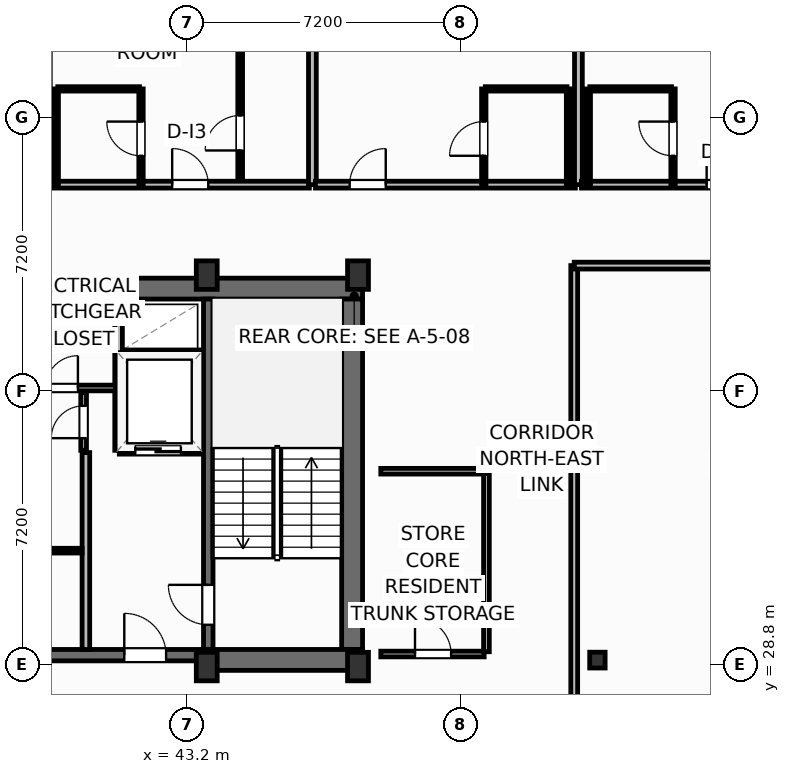
"""IFC4 building model, lengths in metres.
Left out: names, types, materials, properties, quantities, classifications, styles, units other than length and angle.
Written with IfcOpenShell. Run it as: python <this file> out.ifc"""

import sys

from ifc_helpers import new_model, si_unit, direction, frame, frame_2d, origin, origin_2d, place, context, subcontext, project, spatial, rectangle, i_section, extrude, element, fill, save


model = new_model("IFC4")
c1 = context("Model", 3, precision=1e-05, world=origin(), true_north=direction((0.0, 1.0)))
c2 = subcontext(c1, "Body", "Model", "MODEL_VIEW")
j1 = project(units=[si_unit("LENGTHUNIT", "METRE"), si_unit("PLANEANGLEUNIT", "RADIAN")], contexts=[c1])
p1 = place(None, origin())
s1 = spatial("IfcSite", under=j1, at=p1, CompositionType="ELEMENT")
p2 = place(p1, origin())
s2 = spatial("IfcBuilding", under=s1, at=p2, CompositionType="ELEMENT")
p3 = place(p2, frame((0.0, 0.0, 280.4)))
s3 = spatial("IfcBuildingStorey", under=s2, at=p3, CompositionType="ELEMENT", Elevation=280.4)
for number, where, z_axis, x_axis in (
    (1, (43.72, 28.75, 0.0), (0.0, 0.0, 1.0), (1.0, 0.0, 0.0)),
    (2, (47.7, 28.75, 0.0), (0.0, 0.0, 1.0), (1.0, 0.0, 0.0)),
    (3, (43.72, 39.05, 0.0), (0.0, 0.0, 1.0), (1.0, 0.0, 0.0)),
    (4, (47.7, 39.05, 0.0), (0.0, 0.0, 1.0), (1.0, 0.0, 0.0)),
):
    element("IfcColumn", number, at=place(p3, frame(where, z_axis=z_axis, x_axis=x_axis)), inside=s3, PredefinedType="COLUMN", context=c2, shape_type="SweptSolid", body=[
        extrude(rectangle(XDim=0.55, YDim=0.75, at=origin_2d()), origin(), (0.0, 0.0, 1.0), 3.7),
    ])
p4 = place(p3, frame((54.0, 28.92, 0.0), z_axis=(0.0, 0.0, 1.0), x_axis=(1.0, 0.0, 0.0)))
e5 = element("IfcColumn", 5, at=p4, inside=s3, PredefinedType="COLUMN", context=c2, shape_type="SweptSolid", body=[
    extrude(i_section(OverallWidth=0.406, OverallDepth=0.416, WebThickness=0.03, FlangeThickness=0.048, FilletRadius=0.025, at=origin_2d()), origin(), (0.0, 0.0, 1.0), 3.7),
])
p5 = place(p3, frame((30.58, 38.695, 0.0), z_axis=(0.0, 0.0, 1.0), x_axis=(1.0, 0.0, 0.0)))
e6 = element("IfcWall", 6, at=p5, inside=s3, PredefinedType="SHEAR", context=c2, shape_type="SweptSolid", body=[
    extrude(rectangle(XDim=17.24, YDim=0.55, at=frame_2d((8.62, 0.0))), origin(), (0.0, 0.0, 1.0), 3.45),
])
p6 = place(p3, frame((47.545, 29.2, 0.0), z_axis=(0.0, 0.0, 1.0), x_axis=(0.0, 1.0, 0.0)))
e7 = element("IfcWall", 7, at=p6, inside=s3, PredefinedType="SHEAR", context=c2, shape_type="SweptSolid", body=[
    extrude(rectangle(XDim=9.22, YDim=0.55, at=frame_2d((4.61, 0.0))), origin(), (0.0, 0.0, 1.0), 3.45),
])
p7 = place(p3, frame((43.6, 28.925, 0.0), z_axis=(0.0, 0.0, 1.0), x_axis=(1.0, 0.0, 0.0)))
e8 = element("IfcWall", 8, at=p7, inside=s3, PredefinedType="SHEAR", context=c2, shape_type="SweptSolid", body=[
    extrude(rectangle(XDim=4.22, YDim=0.55, at=frame_2d((2.11, 0.0))), origin(), (0.0, 0.0, 1.0), 3.45),
])
p8 = place(p3, frame((34.8, 29.05, 0.0), z_axis=(0.0, 0.0, 1.0), x_axis=(1.0, 0.0, 0.0)))
e9 = element("IfcWall", 9, at=p8, inside=s3, PredefinedType="SHEAR", context=c2, shape_type="SweptSolid", body=[
    extrude(rectangle(XDim=8.8, YDim=0.3, at=frame_2d((4.4, 0.0))), origin(), (0.0, 0.0, 1.0), 3.45),
])
p9 = place(p8, frame((0.95, 0.0, 0.0)))
e10 = element("IfcOpeningElement", 10, at=p9, cuts=e9, PredefinedType="OPENING", context=c2, shape_type="SweptSolid", body=[
    extrude(rectangle(XDim=1.1, YDim=2.15, at=frame_2d((0.55, 1.075))), frame((0.0, 0.16, 0.0), z_axis=(0.0, -1.0, 0.0), x_axis=(1.0, 0.0, 0.0)), (0.0, 0.0, 1.0), 0.32),
])
p10 = place(p8, frame((6.75, 0.0, 0.0)))
e11 = element("IfcOpeningElement", 11, at=p10, cuts=e9, PredefinedType="OPENING", context=c2, shape_type="SweptSolid", body=[
    extrude(rectangle(XDim=1.1, YDim=2.15, at=frame_2d((0.55, 1.075))), frame((0.0, 0.16, 0.0), z_axis=(0.0, -1.0, 0.0), x_axis=(1.0, 0.0, 0.0)), (0.0, 0.0, 1.0), 0.32),
])
p11 = place(p8, frame((3.32, 0.0, 0.0)))
e12 = element("IfcOpeningElement", 12, at=p11, cuts=e9, PredefinedType="OPENING", context=c2, shape_type="SweptSolid", body=[
    extrude(rectangle(XDim=0.95, YDim=2.15, at=frame_2d((0.475, 1.075))), frame((0.0, 0.16, 0.0), z_axis=(0.0, -1.0, 0.0), x_axis=(1.0, 0.0, 0.0)), (0.0, 0.0, 1.0), 0.32),
])
p12 = place(p3, frame((43.76, 29.2, 0.0), z_axis=(0.0, 0.0, 1.0), x_axis=(0.0, 1.0, 0.0)))
e13 = element("IfcWall", 13, at=p12, inside=s3, PredefinedType="SHEAR", context=c2, shape_type="SweptSolid", body=[
    extrude(rectangle(XDim=9.22, YDim=0.25, at=frame_2d((4.61, 0.0))), origin(), (0.0, 0.0, 1.0), 3.45),
])
p13 = place(p12, frame((0.65, 0.0, 0.0)))
e14 = element("IfcOpeningElement", 14, at=p13, cuts=e13, PredefinedType="OPENING", context=c2, shape_type="SweptSolid", body=[
    extrude(rectangle(XDim=1.05, YDim=2.15, at=frame_2d((0.525, 1.075))), frame((0.0, 0.135, 0.0), z_axis=(0.0, -1.0, 0.0), x_axis=(1.0, 0.0, 0.0)), (0.0, 0.0, 1.0), 0.27),
])
p14 = place(p3, frame((44.6, 41.43, 0.0), z_axis=(0.0, 0.0, 1.0), x_axis=(0.0, 1.0, 0.0)))
e15 = element("IfcWall", 15, at=p14, inside=s3, PredefinedType="PARTITIONING", context=c2, shape_type="SweptSolid", body=[
    extrude(rectangle(XDim=12.434, YDim=0.125, at=frame_2d((6.217, 0.0))), origin(), (0.0, 0.0, 1.0), 3.45),
])
p15 = place(p14, frame((0.9, 0.0, 0.0)))
e16 = element("IfcOpeningElement", 16, at=p15, cuts=e15, PredefinedType="OPENING", context=c2, shape_type="SweptSolid", body=[
    extrude(rectangle(XDim=0.92, YDim=2.05, at=frame_2d((0.46, 1.025))), frame((0.0, 0.073, 0.0), z_axis=(0.0, -1.0, 0.0), x_axis=(1.0, 0.0, 0.0)), (0.0, 0.0, 1.0), 0.145),
])
p16 = place(p3, frame((39.58, 41.43, 0.0), z_axis=(0.0, 0.0, 1.0), x_axis=(1.0, 0.0, 0.0)))
e17 = element("IfcWall", 17, at=p16, inside=s3, PredefinedType="PARTITIONING", context=c2, shape_type="SweptSolid", body=[
    extrude(rectangle(XDim=6.84, YDim=0.18, at=frame_2d((3.42, 0.0))), origin(), (0.0, 0.0, 1.0), 3.45),
])
p17 = place(p16, frame((3.23, 0.0, 0.0)))
e18 = element("IfcOpeningElement", 18, at=p17, cuts=e17, PredefinedType="OPENING", context=c2, shape_type="SweptSolid", body=[
    extrude(rectangle(XDim=0.95, YDim=2.15, at=frame_2d((0.475, 1.075))), frame((0.0, 0.1, 0.0), z_axis=(0.0, -1.0, 0.0), x_axis=(1.0, 0.0, 0.0)), (0.0, 0.0, 1.0), 0.2),
])
p18 = place(p3, frame((39.8, 43.95, 0.0), z_axis=(0.0, 0.0, 1.0), x_axis=(1.0, 0.0, 0.0)))
e19 = element("IfcWall", 19, at=p18, inside=s3, PredefinedType="PARTITIONING", context=c2, shape_type="SweptSolid", body=[
    extrude(rectangle(XDim=2.15, YDim=0.115, at=frame_2d((1.075, 0.0))), origin(), (0.0, 0.0, 1.0), 3.45),
])
p19 = place(p3, frame((41.99, 41.43, 0.0), z_axis=(0.0, 0.0, 1.0), x_axis=(0.0, 1.0, 0.0)))
e20 = element("IfcWall", 20, at=p19, inside=s3, PredefinedType="PARTITIONING", context=c2, shape_type="SweptSolid", body=[
    extrude(rectangle(XDim=2.52, YDim=0.115, at=frame_2d((1.26, 0.0))), origin(), (0.0, 0.0, 1.0), 3.45),
])
p20 = place(p19, frame((0.76, 0.0, 0.0)))
e21 = element("IfcOpeningElement", 21, at=p20, cuts=e20, PredefinedType="OPENING", context=c2, shape_type="SweptSolid", body=[
    extrude(rectangle(XDim=0.9, YDim=2.05, at=frame_2d((0.45, 1.025))), frame((0.0, 0.067, 0.0), z_axis=(0.0, -1.0, 0.0), x_axis=(1.0, 0.0, 0.0)), (0.0, 0.0, 1.0), 0.135),
])
p21 = place(p3, frame((39.76, 41.43, 0.0), z_axis=(0.0, 0.0, 1.0), x_axis=(0.0, 1.0, 0.0)))
e22 = element("IfcWall", 22, at=p21, inside=s3, PredefinedType="PARTITIONING", context=c2, shape_type="SweptSolid", body=[
    extrude(rectangle(XDim=2.52, YDim=0.115, at=frame_2d((1.26, 0.0))), origin(), (0.0, 0.0, 1.0), 3.45),
])
p22 = place(p3, frame((46.5, 41.43, 0.0), z_axis=(0.0, 0.0, 1.0), x_axis=(0.0, 1.0, 0.0)))
e23 = element("IfcWall", 23, at=p22, inside=s3, PredefinedType="PARTITIONING", context=c2, shape_type="SweptSolid", body=[
    extrude(rectangle(XDim=13.743, YDim=0.205, at=frame_2d((6.871, 0.0))), origin(), (0.0, 0.0, 1.0), 3.45),
])
p23 = place(p3, frame((46.58, 41.43, 0.0), z_axis=(0.0, 0.0, 1.0), x_axis=(1.0, 0.0, 0.0)))
e24 = element("IfcWall", 24, at=p23, inside=s3, PredefinedType="PARTITIONING", context=c2, shape_type="SweptSolid", body=[
    extrude(rectangle(XDim=6.84, YDim=0.18, at=frame_2d((3.42, 0.0))), origin(), (0.0, 0.0, 1.0), 3.45),
])
p24 = place(p23, frame((0.9, 0.0, 0.0)))
e25 = element("IfcOpeningElement", 25, at=p24, cuts=e24, PredefinedType="OPENING", context=c2, shape_type="SweptSolid", body=[
    extrude(rectangle(XDim=0.95, YDim=2.15, at=frame_2d((0.475, 1.075))), frame((0.0, 0.1, 0.0), z_axis=(0.0, -1.0, 0.0), x_axis=(1.0, 0.0, 0.0)), (0.0, 0.0, 1.0), 0.2),
])
p25 = place(p3, frame((51.05, 43.95, 0.0), z_axis=(0.0, 0.0, 1.0), x_axis=(1.0, 0.0, 0.0)))
e26 = element("IfcWall", 26, at=p25, inside=s3, PredefinedType="PARTITIONING", context=c2, shape_type="SweptSolid", body=[
    extrude(rectangle(XDim=2.15, YDim=0.115, at=frame_2d((1.075, 0.0))), origin(), (0.0, 0.0, 1.0), 3.45),
])
p26 = place(p3, frame((51.01, 41.43, 0.0), z_axis=(0.0, 0.0, 1.0), x_axis=(0.0, 1.0, 0.0)))
e27 = element("IfcWall", 27, at=p26, inside=s3, PredefinedType="PARTITIONING", context=c2, shape_type="SweptSolid", body=[
    extrude(rectangle(XDim=2.52, YDim=0.115, at=frame_2d((1.26, 0.0))), origin(), (0.0, 0.0, 1.0), 3.45),
])
p27 = place(p26, frame((0.76, 0.0, 0.0)))
e28 = element("IfcOpeningElement", 28, at=p27, cuts=e27, PredefinedType="OPENING", context=c2, shape_type="SweptSolid", body=[
    extrude(rectangle(XDim=0.9, YDim=2.05, at=frame_2d((0.45, 1.025))), frame((0.0, 0.067, 0.0), z_axis=(0.0, -1.0, 0.0), x_axis=(1.0, 0.0, 0.0)), (0.0, 0.0, 1.0), 0.135),
])
p28 = place(p3, frame((53.24, 41.43, 0.0), z_axis=(0.0, 0.0, 1.0), x_axis=(0.0, 1.0, 0.0)))
e29 = element("IfcWall", 29, at=p28, inside=s3, PredefinedType="PARTITIONING", context=c2, shape_type="SweptSolid", body=[
    extrude(rectangle(XDim=2.52, YDim=0.115, at=frame_2d((1.26, 0.0))), origin(), (0.0, 0.0, 1.0), 3.45),
])
p29 = place(p3, frame((53.5, 41.43, 0.0), z_axis=(0.0, 0.0, 1.0), x_axis=(0.0, 1.0, 0.0)))
e30 = element("IfcWall", 30, at=p29, inside=s3, PredefinedType="PARTITIONING", context=c2, shape_type="SweptSolid", body=[
    extrude(rectangle(XDim=14.57, YDim=0.205, at=frame_2d((7.285, 0.0))), origin(), (0.0, 0.0, 1.0), 3.45),
])
p30 = place(p3, frame((53.58, 41.43, 0.0), z_axis=(0.0, 0.0, 1.0), x_axis=(1.0, 0.0, 0.0)))
e31 = element("IfcWall", 31, at=p30, inside=s3, PredefinedType="PARTITIONING", context=c2, shape_type="SweptSolid", body=[
    extrude(rectangle(XDim=14.492, YDim=0.18, at=frame_2d((7.246, 0.0))), origin(), (0.0, 0.0, 1.0), 3.45),
])
p31 = place(p30, frame((3.294, 0.0, 0.0)))
e32 = element("IfcOpeningElement", 32, at=p31, cuts=e31, PredefinedType="OPENING", context=c2, shape_type="SweptSolid", body=[
    extrude(rectangle(XDim=0.95, YDim=2.15, at=frame_2d((0.475, 1.075))), frame((0.0, 0.1, 0.0), z_axis=(0.0, -1.0, 0.0), x_axis=(1.0, 0.0, 0.0)), (0.0, 0.0, 1.0), 0.2),
])
p32 = place(p3, frame((53.8, 43.95, 0.0), z_axis=(0.0, 0.0, 1.0), x_axis=(1.0, 0.0, 0.0)))
e33 = element("IfcWall", 33, at=p32, inside=s3, PredefinedType="PARTITIONING", context=c2, shape_type="SweptSolid", body=[
    extrude(rectangle(XDim=2.15, YDim=0.115, at=frame_2d((1.075, 0.0))), origin(), (0.0, 0.0, 1.0), 3.45),
])
p33 = place(p3, frame((55.99, 41.43, 0.0), z_axis=(0.0, 0.0, 1.0), x_axis=(0.0, 1.0, 0.0)))
e34 = element("IfcWall", 34, at=p33, inside=s3, PredefinedType="PARTITIONING", context=c2, shape_type="SweptSolid", body=[
    extrude(rectangle(XDim=2.52, YDim=0.115, at=frame_2d((1.26, 0.0))), origin(), (0.0, 0.0, 1.0), 3.45),
])
p34 = place(p33, frame((0.76, 0.0, 0.0)))
e35 = element("IfcOpeningElement", 35, at=p34, cuts=e34, PredefinedType="OPENING", context=c2, shape_type="SweptSolid", body=[
    extrude(rectangle(XDim=0.9, YDim=2.05, at=frame_2d((0.45, 1.025))), frame((0.0, 0.067, 0.0), z_axis=(0.0, -1.0, 0.0), x_axis=(1.0, 0.0, 0.0)), (0.0, 0.0, 1.0), 0.135),
])
p35 = place(p3, frame((53.76, 41.43, 0.0), z_axis=(0.0, 0.0, 1.0), x_axis=(0.0, 1.0, 0.0)))
e36 = element("IfcWall", 36, at=p35, inside=s3, PredefinedType="PARTITIONING", context=c2, shape_type="SweptSolid", body=[
    extrude(rectangle(XDim=2.52, YDim=0.115, at=frame_2d((1.26, 0.0))), origin(), (0.0, 0.0, 1.0), 3.45),
])
p36 = place(p3, frame((53.39, 19.24, 0.0), z_axis=(0.0, 0.0, 1.0), x_axis=(0.0, 1.0, 0.0)))
e37 = element("IfcWall", 37, at=p36, inside=s3, PredefinedType="PARTITIONING", context=c2, shape_type="SweptSolid", body=[
    extrude(rectangle(XDim=20.06, YDim=0.18, at=frame_2d((10.03, 0.0))), origin(), (0.0, 0.0, 1.0), 3.45),
])
p37 = place(p36, frame((7.7, 0.0, 0.0)))
e38 = element("IfcOpeningElement", 38, at=p37, cuts=e37, PredefinedType="OPENING", context=c2, shape_type="SweptSolid", body=[
    extrude(rectangle(XDim=0.95, YDim=2.05, at=frame_2d((0.475, 1.025))), frame((0.0, 0.1, 0.0), z_axis=(0.0, -1.0, 0.0), x_axis=(1.0, 0.0, 0.0)), (0.0, 0.0, 1.0), 0.2),
])
p38 = place(p3, frame((53.39, 39.3, 0.0), z_axis=(0.0, 0.0, 1.0), x_axis=(1.0, 0.0, 0.0)))
e39 = element("IfcWall", 39, at=p38, inside=s3, PredefinedType="PARTITIONING", context=c2, shape_type="SweptSolid", body=[
    extrude(rectangle(XDim=16.149, YDim=0.18, at=frame_2d((8.075, 0.0))), origin(), (0.0, 0.0, 1.0), 2.739),
])
p39 = place(p3, frame((40.54, 29.2, 0.0), z_axis=(0.0, 0.0, 1.0), x_axis=(0.0, 1.0, 0.0)))
e40 = element("IfcWall", 40, at=p39, inside=s3, PredefinedType="PARTITIONING", context=c2, shape_type="SweptSolid", body=[
    extrude(rectangle(XDim=5.18, YDim=0.2, at=frame_2d((2.59, 0.0))), origin(), (0.0, 0.0, 1.0), 3.45),
])
p40 = place(p3, frame((41.42, 34.44, 0.0), z_axis=(0.0, 0.0, 1.0), x_axis=(1.0, 0.0, 0.0)))
e41 = element("IfcWall", 41, at=p40, inside=s3, PredefinedType="PARTITIONING", context=c2, shape_type="SweptSolid", body=[
    extrude(rectangle(XDim=2.18, YDim=0.2, at=frame_2d((1.09, 0.0))), origin(), (0.0, 0.0, 1.0), 3.45),
])
p41 = place(p40, frame((0.42, 0.0, 0.0)))
e42 = element("IfcOpeningElement", 42, at=p41, cuts=e41, PredefinedType="OPENING", context=c2, shape_type="SweptSolid", body=[
    extrude(rectangle(XDim=1.2, YDim=2.2, at=frame_2d((0.6, 1.1))), frame((0.0, 0.11, 0.0), z_axis=(0.0, -1.0, 0.0), x_axis=(1.0, 0.0, 0.0)), (0.0, 0.0, 1.0), 0.22),
])
p42 = place(p3, frame((41.42, 36.98, 0.0), z_axis=(0.0, 0.0, 1.0), x_axis=(1.0, 0.0, 0.0)))
e43 = element("IfcWall", 43, at=p42, inside=s3, PredefinedType="PARTITIONING", context=c2, shape_type="SweptSolid", body=[
    extrude(rectangle(XDim=2.18, YDim=0.2, at=frame_2d((1.09, 0.0))), origin(), (0.0, 0.0, 1.0), 3.45),
])
p43 = place(p3, frame((41.4, 34.44, 0.0), z_axis=(0.0, 0.0, 1.0), x_axis=(0.0, 1.0, 0.0)))
e44 = element("IfcWall", 44, at=p43, inside=s3, PredefinedType="PARTITIONING", context=c2, shape_type="SweptSolid", body=[
    extrude(rectangle(XDim=3.9, YDim=0.2, at=frame_2d((1.95, 0.0))), origin(), (0.0, 0.0, 1.0), 3.45),
])
p44 = place(p3, frame((39.3, 36.08, 0.0), z_axis=(0.0, 0.0, 1.0), x_axis=(1.0, 0.0, 0.0)))
e45 = element("IfcWall", 45, at=p44, inside=s3, PredefinedType="PARTITIONING", context=c2, shape_type="SweptSolid", body=[
    extrude(rectangle(XDim=2.02, YDim=0.15, at=frame_2d((1.01, 0.0))), origin(), (0.0, 0.0, 1.0), 3.45),
])
p45 = place(p44, frame((0.18, 0.0, 0.0)))
e46 = element("IfcOpeningElement", 46, at=p45, cuts=e45, PredefinedType="OPENING", context=c2, shape_type="SweptSolid", body=[
    extrude(rectangle(XDim=0.85, YDim=2.05, at=frame_2d((0.425, 1.025))), frame((0.0, 0.085, 0.0), z_axis=(0.0, -1.0, 0.0), x_axis=(1.0, 0.0, 0.0)), (0.0, 0.0, 1.0), 0.17),
])
p46 = place(p3, frame((40.48, 34.44, 0.0), z_axis=(0.0, 0.0, 1.0), x_axis=(0.0, 1.0, 0.0)))
e47 = element("IfcWall", 47, at=p46, inside=s3, PredefinedType="PARTITIONING", context=c2, shape_type="SweptSolid", body=[
    extrude(rectangle(XDim=1.52, YDim=0.15, at=frame_2d((0.76, 0.0))), origin(), (0.0, 0.0, 1.0), 3.45),
])
p47 = place(p46, frame((0.32, 0.0, 0.0)))
e48 = element("IfcOpeningElement", 48, at=p47, cuts=e47, PredefinedType="OPENING", context=c2, shape_type="SweptSolid", body=[
    extrude(rectangle(XDim=0.85, YDim=2.05, at=frame_2d((0.425, 1.025))), frame((0.0, 0.085, 0.0), z_axis=(0.0, -1.0, 0.0), x_axis=(1.0, 0.0, 0.0)), (0.0, 0.0, 1.0), 0.17),
])
p48 = place(p3, frame((39.35, 31.8, 0.0), z_axis=(0.0, 0.0, 1.0), x_axis=(1.0, 0.0, 0.0)))
e49 = element("IfcWall", 49, at=p48, inside=s3, PredefinedType="PARTITIONING", context=c2, shape_type="SweptSolid", body=[
    extrude(rectangle(XDim=1.09, YDim=0.125, at=frame_2d((0.545, 0.0))), origin(), (0.0, 0.0, 1.0), 3.45),
])
p49 = place(p3, frame((48.3, 29.08, 0.0), z_axis=(0.0, 0.0, 1.0), x_axis=(1.0, 0.0, 0.0)))
e50 = element("IfcWall", 50, at=p49, inside=s3, PredefinedType="PARTITIONING", context=c2, shape_type="SweptSolid", body=[
    extrude(rectangle(XDim=2.72, YDim=0.15, at=frame_2d((1.36, 0.0))), origin(), (0.0, 0.0, 1.0), 2.662),
])
p50 = place(p49, frame((0.9, 0.0, 0.0)))
e51 = element("IfcOpeningElement", 51, at=p50, cuts=e50, PredefinedType="OPENING", context=c2, shape_type="SweptSolid", body=[
    extrude(rectangle(XDim=0.95, YDim=2.05, at=frame_2d((0.475, 1.025))), frame((0.0, 0.085, 0.0), z_axis=(0.0, -1.0, 0.0), x_axis=(1.0, 0.0, 0.0)), (0.0, 0.0, 1.0), 0.17),
])
p51 = place(p3, frame((48.3, 33.89, 0.0), z_axis=(0.0, 0.0, 1.0), x_axis=(1.0, 0.0, 0.0)))
e52 = element("IfcWall", 52, at=p51, inside=s3, PredefinedType="PARTITIONING", context=c2, shape_type="SweptSolid", body=[
    extrude(rectangle(XDim=2.72, YDim=0.15, at=frame_2d((1.36, 0.0))), origin(), (0.0, 0.0, 1.0), 3.45),
])
p52 = place(p3, frame((51.08, 29.14, 0.0), z_axis=(0.0, 0.0, 1.0), x_axis=(0.0, 1.0, 0.0)))
e53 = element("IfcWall", 53, at=p52, inside=s3, PredefinedType="PARTITIONING", context=c2, shape_type="SweptSolid", body=[
    extrude(rectangle(XDim=4.69, YDim=0.15, at=frame_2d((2.345, 0.0))), origin(), (0.0, 0.0, 1.0), 3.45),
])
p53 = place(p15, origin())
e54 = element("IfcDoor", 54, at=p53, inside=s3, OperationType="SINGLE_SWING_LEFT", PredefinedType="DOOR", context=c2, shape_type="SweptSolid", body=[
    extrude(rectangle(XDim=0.92, YDim=2.05, at=frame_2d((0.46, 1.025))), frame((0.0, 0.025, 0.0), z_axis=(0.0, -1.0, 0.0), x_axis=(1.0, 0.0, 0.0)), (0.0, 0.0, 1.0), 0.05),
])
fill(e16, e54)
p54 = place(p17, origin())
e55 = element("IfcDoor", 55, at=p54, inside=s3, OperationType="SINGLE_SWING_LEFT", PredefinedType="DOOR", context=c2, shape_type="SweptSolid", body=[
    extrude(rectangle(XDim=0.95, YDim=2.15, at=frame_2d((0.475, 1.075))), frame((0.0, 0.025, 0.0), z_axis=(0.0, -1.0, 0.0), x_axis=(1.0, 0.0, 0.0)), (0.0, 0.0, 1.0), 0.05),
])
fill(e18, e55)
p55 = place(p20, origin())
e56 = element("IfcDoor", 56, at=p55, inside=s3, OperationType="SINGLE_SWING_RIGHT", PredefinedType="DOOR", context=c2, shape_type="SweptSolid", body=[
    extrude(rectangle(XDim=0.9, YDim=2.05, at=frame_2d((0.45, 1.025))), frame((0.0, 0.025, 0.0), z_axis=(0.0, -1.0, 0.0), x_axis=(1.0, 0.0, 0.0)), (0.0, 0.0, 1.0), 0.05),
])
fill(e21, e56)
p56 = place(p24, origin())
e57 = element("IfcDoor", 57, at=p56, inside=s3, OperationType="SINGLE_SWING_RIGHT", PredefinedType="DOOR", context=c2, shape_type="SweptSolid", body=[
    extrude(rectangle(XDim=0.95, YDim=2.15, at=frame_2d((0.475, 1.075))), frame((0.0, 0.025, 0.0), z_axis=(0.0, -1.0, 0.0), x_axis=(1.0, 0.0, 0.0)), (0.0, 0.0, 1.0), 0.05),
])
fill(e25, e57)
p57 = place(p27, origin())
e58 = element("IfcDoor", 58, at=p57, inside=s3, OperationType="SINGLE_SWING_LEFT", PredefinedType="DOOR", context=c2, shape_type="SweptSolid", body=[
    extrude(rectangle(XDim=0.9, YDim=2.05, at=frame_2d((0.45, 1.025))), frame((0.0, 0.025, 0.0), z_axis=(0.0, -1.0, 0.0), x_axis=(1.0, 0.0, 0.0)), (0.0, 0.0, 1.0), 0.05),
])
fill(e28, e58)
p58 = place(p31, origin())
e59 = element("IfcDoor", 59, at=p58, inside=s3, OperationType="SINGLE_SWING_LEFT", PredefinedType="DOOR", context=c2, shape_type="SweptSolid", body=[
    extrude(rectangle(XDim=0.95, YDim=2.15, at=frame_2d((0.475, 1.075))), frame((0.0, 0.025, 0.0), z_axis=(0.0, -1.0, 0.0), x_axis=(1.0, 0.0, 0.0)), (0.0, 0.0, 1.0), 0.05),
])
fill(e32, e59)
p59 = place(p34, origin())
e60 = element("IfcDoor", 60, at=p59, inside=s3, OperationType="SINGLE_SWING_RIGHT", PredefinedType="DOOR", context=c2, shape_type="SweptSolid", body=[
    extrude(rectangle(XDim=0.9, YDim=2.05, at=frame_2d((0.45, 1.025))), frame((0.0, 0.025, 0.0), z_axis=(0.0, -1.0, 0.0), x_axis=(1.0, 0.0, 0.0)), (0.0, 0.0, 1.0), 0.05),
])
fill(e35, e60)
p60 = place(p13, origin())
e61 = element("IfcDoor", 61, at=p60, inside=s3, OperationType="SINGLE_SWING_RIGHT", PredefinedType="DOOR", context=c2, shape_type="SweptSolid", body=[
    extrude(rectangle(XDim=1.05, YDim=2.15, at=frame_2d((0.525, 1.075))), frame((0.0, 0.025, 0.0), z_axis=(0.0, -1.0, 0.0), x_axis=(1.0, 0.0, 0.0)), (0.0, 0.0, 1.0), 0.05),
])
fill(e14, e61)
p61 = place(p10, origin())
e62 = element("IfcDoor", 62, at=p61, inside=s3, OperationType="SINGLE_SWING_LEFT", PredefinedType="DOOR", context=c2, shape_type="SweptSolid", body=[
    extrude(rectangle(XDim=1.1, YDim=2.15, at=frame_2d((0.55, 1.075))), frame((0.0, 0.025, 0.0), z_axis=(0.0, -1.0, 0.0), x_axis=(1.0, 0.0, 0.0)), (0.0, 0.0, 1.0), 0.05),
])
fill(e11, e62)
p62 = place(p41, origin())
e63 = element("IfcDoor", 63, at=p62, inside=s3, OperationType="SLIDING_TO_LEFT", PredefinedType="DOOR", context=c2, shape_type="SweptSolid", body=[
    extrude(rectangle(XDim=1.2, YDim=2.2, at=frame_2d((0.6, 1.1))), frame((0.0, 0.025, 0.0), z_axis=(0.0, -1.0, 0.0), x_axis=(1.0, 0.0, 0.0)), (0.0, 0.0, 1.0), 0.05),
])
fill(e42, e63)
p63 = place(p45, origin())
e64 = element("IfcDoor", 64, at=p63, inside=s3, OperationType="SINGLE_SWING_RIGHT", PredefinedType="DOOR", context=c2, shape_type="SweptSolid", body=[
    extrude(rectangle(XDim=0.85, YDim=2.05, at=frame_2d((0.425, 1.025))), frame((0.0, 0.025, 0.0), z_axis=(0.0, -1.0, 0.0), x_axis=(1.0, 0.0, 0.0)), (0.0, 0.0, 1.0), 0.05),
])
fill(e46, e64)
p64 = place(p47, origin())
e65 = element("IfcDoor", 65, at=p64, inside=s3, OperationType="SINGLE_SWING_LEFT", PredefinedType="DOOR", context=c2, shape_type="SweptSolid", body=[
    extrude(rectangle(XDim=0.85, YDim=2.05, at=frame_2d((0.425, 1.025))), frame((0.0, 0.025, 0.0), z_axis=(0.0, -1.0, 0.0), x_axis=(1.0, 0.0, 0.0)), (0.0, 0.0, 1.0), 0.05),
])
fill(e48, e65)
p65 = place(p50, origin())
e66 = element("IfcDoor", 66, at=p65, inside=s3, OperationType="SINGLE_SWING_LEFT", PredefinedType="DOOR", context=c2, shape_type="SweptSolid", body=[
    extrude(rectangle(XDim=0.95, YDim=2.05, at=frame_2d((0.475, 1.025))), frame((0.0, 0.025, 0.0), z_axis=(0.0, -1.0, 0.0), x_axis=(1.0, 0.0, 0.0)), (0.0, 0.0, 1.0), 0.05),
])
fill(e51, e66)
save(model, sys.argv[1])
